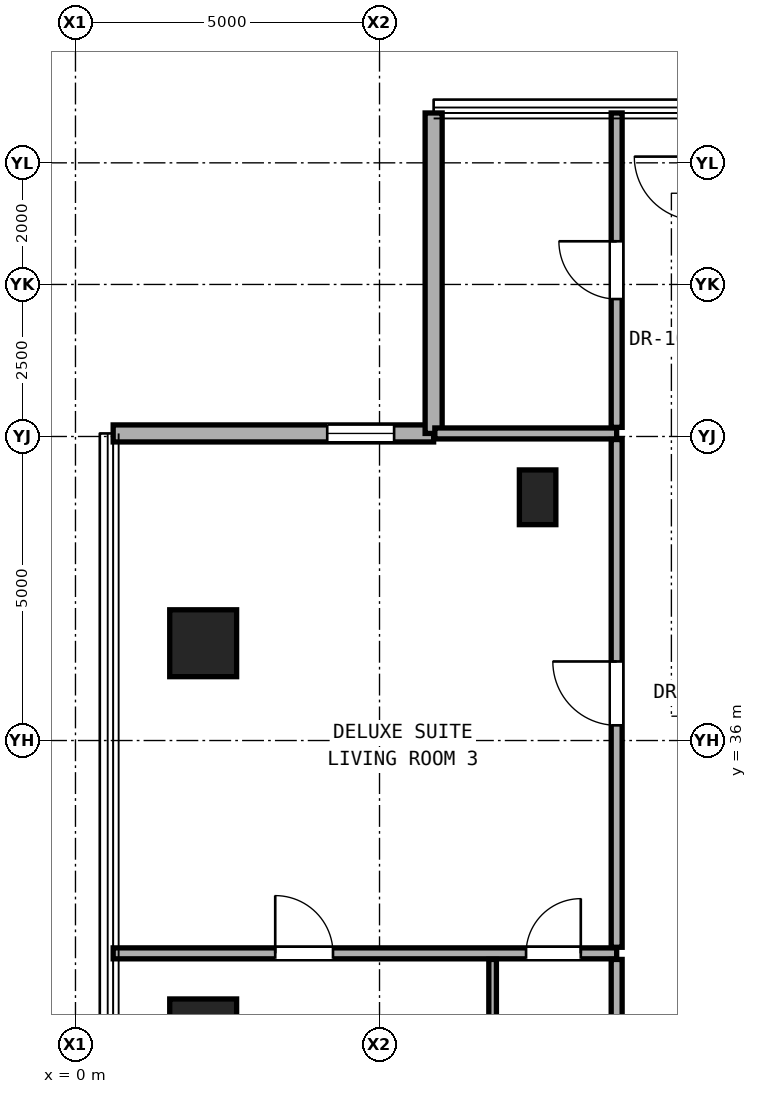
"""IFC4 building model, lengths in metres.
Left out: names, types, materials, properties, quantities, classifications, styles, units other than length and angle.
Written with IfcOpenShell. Run it as: python <this file> out.ifc"""

import sys

from ifc_helpers import new_model, si_unit, direction, frame, frame_2d, origin, origin_2d, place, context, subcontext, project, spatial, rectangle, hollow_rectangle, extrude, element, fill, save


model = new_model("IFC4")
c1 = context("Model", 3, precision=1e-05, world=origin(), true_north=direction((0.0, 1.0)))
c2 = subcontext(c1, "Body", "Model", "MODEL_VIEW")
j1 = project(units=[si_unit("LENGTHUNIT", "METRE"), si_unit("PLANEANGLEUNIT", "RADIAN")], contexts=[c1])
p1 = place(None, origin())
s1 = spatial("IfcSite", under=j1, at=p1, CompositionType="ELEMENT")
p2 = place(p1, origin())
s2 = spatial("IfcBuilding", under=s1, at=p2, CompositionType="ELEMENT")
p3 = place(p2, frame((0.0, 0.0, 118.1)))
s3 = spatial("IfcBuildingStorey", under=s2, at=p3, CompositionType="ELEMENT", Elevation=118.1)
for number, where, z_axis, x_axis in (
    (1, (2.1, 31.2, 0.0), (0.0, 0.0, 1.0), (1.0, 0.0, 0.0)),
    (2, (2.1, 37.6, 0.0), (0.0, 0.0, 1.0), (1.0, 0.0, 0.0)),
):
    element("IfcColumn", number, at=place(p3, frame(where, z_axis=z_axis, x_axis=x_axis)), inside=s3, PredefinedType="COLUMN", context=c2, shape_type="SweptSolid", body=[
        extrude(hollow_rectangle(XDim=1.1, YDim=1.1, WallThickness=0.06, at=origin_2d()), origin(), (0.0, 0.0, 1.0), 3.3),
    ])
p4 = place(p3, frame((7.6, 40.0, 0.0), z_axis=(0.0, 0.0, 1.0), x_axis=(1.0, 0.0, 0.0)))
e3 = element("IfcColumn", 3, at=p4, inside=s3, PredefinedType="PILASTER", context=c2, shape_type="SweptSolid", body=[
    extrude(rectangle(XDim=0.6, YDim=0.9, at=origin_2d()), origin(), (0.0, 0.0, 1.0), 3.3),
])
p5 = place(p3, frame((5.89, 41.05, 0.0), z_axis=(0.0, 0.0, 1.0), x_axis=(-1.0, 0.0, 0.0)))
e4 = element("IfcWall", 4, at=p5, inside=s3, PredefinedType="SOLIDWALL", context=c2, shape_type="SweptSolid", body=[
    extrude(rectangle(XDim=5.27, YDim=0.28, at=frame_2d((2.635, 0.0))), origin(), (0.0, 0.0, 1.0), 3.06),
])
p6 = place(p5, frame((0.65, 0.0, 0.85)))
e5 = element("IfcOpeningElement", 5, at=p6, cuts=e4, PredefinedType="OPENING", context=c2, shape_type="SweptSolid", body=[
    extrude(rectangle(XDim=1.1, YDim=2.0, at=frame_2d((0.55, 1.0))), frame((0.0, 0.15, 0.0), z_axis=(0.0, -1.0, 0.0), x_axis=(1.0, 0.0, 0.0)), (0.0, 0.0, 1.0), 0.3),
])
p7 = place(p3, frame((5.89, 46.32, 0.0), z_axis=(0.0, 0.0, 1.0), x_axis=(0.0, -1.0, 0.0)))
e6 = element("IfcWall", 6, at=p7, inside=s3, PredefinedType="SOLIDWALL", context=c2, shape_type="SweptSolid", body=[
    extrude(rectangle(XDim=5.27, YDim=0.28, at=frame_2d((2.635, 0.0))), origin(), (0.0, 0.0, 1.0), 3.06),
])
p8 = place(p3, frame((0.62, 32.5, 0.0), z_axis=(0.0, 0.0, 1.0), x_axis=(1.0, 0.0, 0.0)))
e7 = element("IfcWall", 7, at=p8, inside=s3, PredefinedType="PARTITIONING", context=c2, shape_type="SweptSolid", body=[
    extrude(rectangle(XDim=8.28, YDim=0.18, at=frame_2d((4.14, 0.0))), origin(), (0.0, 0.0, 1.0), 2.299),
])
p9 = place(p8, frame((2.665, 0.0, 0.0)))
e8 = element("IfcOpeningElement", 8, at=p9, cuts=e7, PredefinedType="OPENING", context=c2, shape_type="SweptSolid", body=[
    extrude(rectangle(XDim=0.95, YDim=2.15, at=frame_2d((0.475, 1.075))), frame((0.0, 0.1, 0.0), z_axis=(0.0, -1.0, 0.0), x_axis=(1.0, 0.0, 0.0)), (0.0, 0.0, 1.0), 0.2),
])
p10 = place(p8, frame((6.79, 0.0, 0.0)))
e9 = element("IfcOpeningElement", 9, at=p10, cuts=e7, PredefinedType="OPENING", context=c2, shape_type="SweptSolid", body=[
    extrude(rectangle(XDim=0.9, YDim=2.1, at=frame_2d((0.45, 1.05))), frame((0.0, 0.1, 0.0), z_axis=(0.0, -1.0, 0.0), x_axis=(1.0, 0.0, 0.0)), (0.0, 0.0, 1.0), 0.2),
])
p11 = place(p3, frame((5.91, 41.05, 0.0), z_axis=(0.0, 0.0, 1.0), x_axis=(1.0, 0.0, 0.0)))
e10 = element("IfcWall", 10, at=p11, inside=s3, PredefinedType="PARTITIONING", context=c2, shape_type="SweptSolid", body=[
    extrude(rectangle(XDim=2.99, YDim=0.18, at=frame_2d((1.495, 0.0))), origin(), (0.0, 0.0, 1.0), 3.08),
])
p12 = place(p3, frame((6.86, 29.853, 0.0), z_axis=(0.0, 0.0, 1.0), x_axis=(0.0, 1.0, 0.0)))
e11 = element("IfcWall", 11, at=p12, inside=s3, PredefinedType="PARTITIONING", context=c2, shape_type="SweptSolid", body=[
    extrude(rectangle(XDim=2.547, YDim=0.125, at=frame_2d((1.274, 0.0))), origin(), (0.0, 0.0, 1.0), 2.299),
])
p13 = place(p3, frame((8.9, 29.853, 0.0), z_axis=(0.0, 0.0, 1.0), x_axis=(0.0, 1.0, 0.0)))
e12 = element("IfcWall", 12, at=p13, inside=s3, PredefinedType="PARTITIONING", context=c2, shape_type="SweptSolid", body=[
    extrude(rectangle(XDim=2.547, YDim=0.18, at=frame_2d((1.274, 0.0))), origin(), (0.0, 0.0, 1.0), 2.299),
])
p14 = place(p3, frame((8.9, 32.6, 0.0), z_axis=(0.0, 0.0, 1.0), x_axis=(0.0, 1.0, 0.0)))
e13 = element("IfcWall", 13, at=p14, inside=s3, PredefinedType="PARTITIONING", context=c2, shape_type="SweptSolid", body=[
    extrude(rectangle(XDim=8.35, YDim=0.18, at=frame_2d((4.175, 0.0))), origin(), (0.0, 0.0, 1.0), 2.456),
])
p15 = place(p14, frame((3.65, 0.0, 0.0)))
e14 = element("IfcOpeningElement", 14, at=p15, cuts=e13, PredefinedType="OPENING", context=c2, shape_type="SweptSolid", body=[
    extrude(rectangle(XDim=1.05, YDim=2.2, at=frame_2d((0.525, 1.1))), frame((0.0, 0.1, 0.0), z_axis=(0.0, -1.0, 0.0), x_axis=(1.0, 0.0, 0.0)), (0.0, 0.0, 1.0), 0.2),
])
p16 = place(p3, frame((8.9, 41.15, 0.0), z_axis=(0.0, 0.0, 1.0), x_axis=(0.0, 1.0, 0.0)))
e15 = element("IfcWall", 15, at=p16, inside=s3, PredefinedType="PARTITIONING", context=c2, shape_type="SweptSolid", body=[
    extrude(rectangle(XDim=5.17, YDim=0.18, at=frame_2d((2.585, 0.0))), origin(), (0.0, 0.0, 1.0), 3.08),
])
p17 = place(p16, frame((2.11, 0.0, 0.0)))
e16 = element("IfcOpeningElement", 16, at=p17, cuts=e15, PredefinedType="OPENING", context=c2, shape_type="SweptSolid", body=[
    extrude(rectangle(XDim=0.95, YDim=2.15, at=frame_2d((0.475, 1.075))), frame((0.0, 0.1, 0.0), z_axis=(0.0, -1.0, 0.0), x_axis=(1.0, 0.0, 0.0)), (0.0, 0.0, 1.0), 0.2),
])
p18 = place(p6, origin())
e17 = element("IfcWindow", 17, at=p18, inside=s3, PartitioningType="SINGLE_PANEL", PredefinedType="WINDOW", context=c2, shape_type="SweptSolid", body=[
    extrude(rectangle(XDim=1.1, YDim=2.0, at=frame_2d((0.55, 1.0))), frame((0.0, 0.03, 0.0), z_axis=(0.0, -1.0, 0.0), x_axis=(1.0, 0.0, 0.0)), (0.0, 0.0, 1.0), 0.06),
])
fill(e5, e17)
p19 = place(p15, origin())
e18 = element("IfcDoor", 18, at=p19, inside=s3, OperationType="SINGLE_SWING_RIGHT", PredefinedType="DOOR", context=c2, shape_type="SweptSolid", body=[
    extrude(rectangle(XDim=1.05, YDim=2.2, at=frame_2d((0.525, 1.1))), frame((0.0, 0.025, 0.0), z_axis=(0.0, -1.0, 0.0), x_axis=(1.0, 0.0, 0.0)), (0.0, 0.0, 1.0), 0.05),
])
fill(e14, e18)
p20 = place(p9, origin())
e19 = element("IfcDoor", 19, at=p20, inside=s3, OperationType="SINGLE_SWING_LEFT", PredefinedType="DOOR", context=c2, shape_type="SweptSolid", body=[
    extrude(rectangle(XDim=0.95, YDim=2.15, at=frame_2d((0.475, 1.075))), frame((0.0, 0.025, 0.0), z_axis=(0.0, -1.0, 0.0), x_axis=(1.0, 0.0, 0.0)), (0.0, 0.0, 1.0), 0.05),
])
fill(e8, e19)
p21 = place(p10, origin())
e20 = element("IfcDoor", 20, at=p21, inside=s3, OperationType="SINGLE_SWING_RIGHT", PredefinedType="DOOR", context=c2, shape_type="SweptSolid", body=[
    extrude(rectangle(XDim=0.9, YDim=2.1, at=frame_2d((0.45, 1.05))), frame((0.0, 0.025, 0.0), z_axis=(0.0, -1.0, 0.0), x_axis=(1.0, 0.0, 0.0)), (0.0, 0.0, 1.0), 0.05),
])
fill(e9, e20)
p22 = place(p17, origin())
e21 = element("IfcDoor", 21, at=p22, inside=s3, OperationType="SINGLE_SWING_RIGHT", PredefinedType="DOOR", context=c2, shape_type="SweptSolid", body=[
    extrude(rectangle(XDim=0.95, YDim=2.15, at=frame_2d((0.475, 1.075))), frame((0.0, 0.025, 0.0), z_axis=(0.0, -1.0, 0.0), x_axis=(1.0, 0.0, 0.0)), (0.0, 0.0, 1.0), 0.05),
])
fill(e16, e21)
save(model, sys.argv[1])
